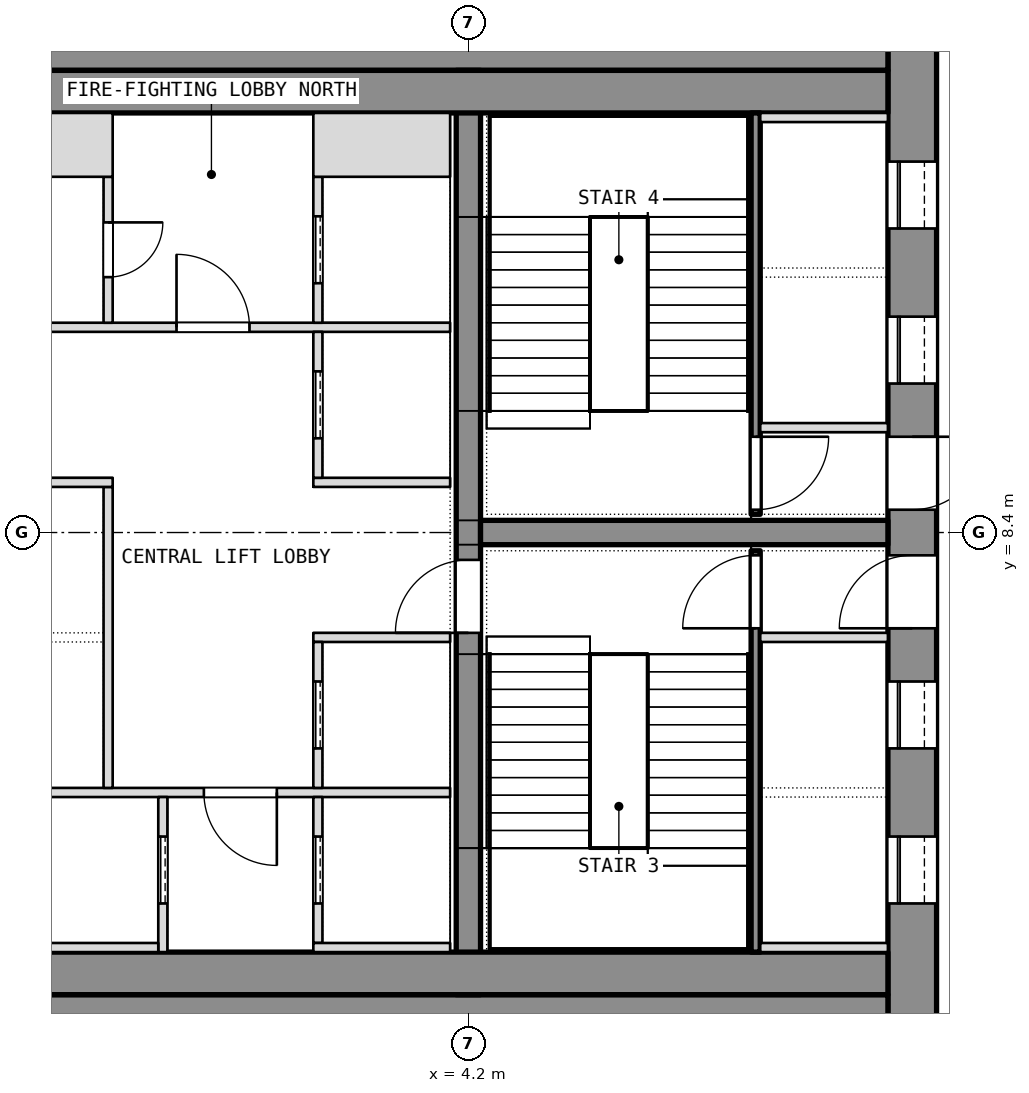
"""IFC4 building model, lengths in metres.
Left out: names, types, materials, properties, quantities, classifications, styles, units other than length and angle.
Written with IfcOpenShell. Run it as: python <this file> out.ifc"""

import sys

from ifc_helpers import new_model, si_unit, direction, frame, frame_2d, origin, place, context, subcontext, project, spatial, rectangle, extrude, element, fill, save


model = new_model("IFC4")
c1 = context("Model", 3, precision=1e-05, world=origin(), true_north=direction((0.0, 1.0)))
c2 = subcontext(c1, "Body", "Model", "MODEL_VIEW")
j1 = project(units=[si_unit("LENGTHUNIT", "METRE"), si_unit("PLANEANGLEUNIT", "RADIAN")], contexts=[c1])
p1 = place(None, origin())
s1 = spatial("IfcSite", under=j1, at=p1, CompositionType="ELEMENT")
p2 = place(p1, origin())
s2 = spatial("IfcBuilding", under=s1, at=p2, CompositionType="ELEMENT")
p3 = place(p2, frame((0.0, 0.0, 180.5)))
s3 = spatial("IfcBuildingStorey", under=s2, at=p3, CompositionType="ELEMENT", Elevation=180.5)
p4 = place(p3, frame((11.5, 0.0, 0.0), z_axis=(0.0, 0.0, 1.0), x_axis=(0.0, 1.0, 0.0)))
e1 = element("IfcWall", 1, at=p4, inside=s3, PredefinedType="SHEAR", context=c2, shape_type="SweptSolid", body=[
    extrude(rectangle(XDim=16.8, YDim=0.8, at=frame_2d((8.4, 0.0))), origin(), (0.0, 0.0, 1.0), 7.2),
])
p5 = place(p4, frame((2.3, 0.0, 0.0)))
e2 = element("IfcOpeningElement", 2, at=p5, cuts=e1, PredefinedType="OPENING", context=c2, shape_type="SweptSolid", body=[
    extrude(rectangle(XDim=1.1, YDim=2.1, at=frame_2d((0.55, 1.05))), frame((0.0, 0.4, 0.0), z_axis=(0.0, -1.0, 0.0), x_axis=(1.0, 0.0, 0.0)), (0.0, 0.0, 1.0), 0.8),
])
p6 = place(p4, frame((4.85, 0.0, 0.0)))
e3 = element("IfcOpeningElement", 3, at=p6, cuts=e1, PredefinedType="OPENING", context=c2, shape_type="SweptSolid", body=[
    extrude(rectangle(XDim=1.1, YDim=2.1, at=frame_2d((0.55, 1.05))), frame((0.0, 0.4, 0.0), z_axis=(0.0, -1.0, 0.0), x_axis=(1.0, 0.0, 0.0)), (0.0, 0.0, 1.0), 0.8),
])
p7 = place(p4, frame((6.825, 0.0, 0.0)))
e4 = element("IfcOpeningElement", 4, at=p7, cuts=e1, PredefinedType="OPENING", context=c2, shape_type="SweptSolid", body=[
    extrude(rectangle(XDim=1.2, YDim=2.1, at=frame_2d((0.6, 1.05))), frame((0.0, 0.4, 0.0), z_axis=(0.0, -1.0, 0.0), x_axis=(1.0, 0.0, 0.0)), (0.0, 0.0, 1.0), 0.8),
])
p8 = place(p4, frame((13.4, 0.0, 0.0)))
e5 = element("IfcOpeningElement", 5, at=p8, cuts=e1, PredefinedType="OPENING", context=c2, shape_type="SweptSolid", body=[
    extrude(rectangle(XDim=1.1, YDim=2.1, at=frame_2d((0.55, 1.05))), frame((0.0, 0.4, 0.0), z_axis=(0.0, -1.0, 0.0), x_axis=(1.0, 0.0, 0.0)), (0.0, 0.0, 1.0), 0.8),
])
p9 = place(p4, frame((10.85, 0.0, 0.0)))
e6 = element("IfcOpeningElement", 6, at=p9, cuts=e1, PredefinedType="OPENING", context=c2, shape_type="SweptSolid", body=[
    extrude(rectangle(XDim=1.1, YDim=2.1, at=frame_2d((0.55, 1.05))), frame((0.0, 0.4, 0.0), z_axis=(0.0, -1.0, 0.0), x_axis=(1.0, 0.0, 0.0)), (0.0, 0.0, 1.0), 0.8),
])
p10 = place(p4, frame((8.775, 0.0, 0.0)))
e7 = element("IfcOpeningElement", 7, at=p10, cuts=e1, PredefinedType="OPENING", context=c2, shape_type="SweptSolid", body=[
    extrude(rectangle(XDim=1.2, YDim=2.1, at=frame_2d((0.6, 1.05))), frame((0.0, 0.4, 0.0), z_axis=(0.0, -1.0, 0.0), x_axis=(1.0, 0.0, 0.0)), (0.0, 0.0, 1.0), 0.8),
])
for number, where, z_axis, x_axis in (
    (8, (-11.1, 0.4, 0.0), (0.0, 0.0, 1.0), (1.0, 0.0, 0.0)),
    (9, (-11.1, 16.4, 0.0), (0.0, 0.0, 1.0), (1.0, 0.0, 0.0)),
):
    element("IfcWall", number, at=place(p3, frame(where, z_axis=z_axis, x_axis=x_axis)), inside=s3, PredefinedType="SHEAR", context=c2, shape_type="SweptSolid", body=[
        extrude(rectangle(XDim=22.2, YDim=0.8, at=frame_2d((11.1, 0.0))), origin(), (0.0, 0.0, 1.0), 7.2),
    ])
p11 = place(p3, frame((4.2, 0.8, 0.0), z_axis=(0.0, 0.0, 1.0), x_axis=(0.0, 1.0, 0.0)))
e10 = element("IfcWall", 10, at=p11, inside=s3, PredefinedType="SHEAR", context=c2, shape_type="SweptSolid", body=[
    extrude(rectangle(XDim=15.2, YDim=0.4, at=frame_2d((7.6, 0.0))), origin(), (0.0, 0.0, 1.0), 7.2),
])
p12 = place(p11, frame((5.95, 0.0, 0.0)))
e11 = element("IfcOpeningElement", 11, at=p12, cuts=e10, PredefinedType="OPENING", context=c2, shape_type="SweptSolid", body=[
    extrude(rectangle(XDim=1.2, YDim=2.1, at=frame_2d((0.6, 1.05))), frame((0.0, 0.2, 0.0), z_axis=(0.0, -1.0, 0.0), x_axis=(1.0, 0.0, 0.0)), (0.0, 0.0, 1.0), 0.4),
])
p13 = place(p3, frame((4.4, 8.4, 0.0), z_axis=(0.0, 0.0, 1.0), x_axis=(1.0, 0.0, 0.0)))
e12 = element("IfcWall", 12, at=p13, inside=s3, PredefinedType="SHEAR", context=c2, shape_type="SweptSolid", body=[
    extrude(rectangle(XDim=6.7, YDim=0.4, at=frame_2d((3.35, 0.0))), origin(), (0.0, 0.0, 1.0), 7.2),
])
for number, where, z_axis, x_axis in (
    (13, (-11.1, 1.15, 0.0), (0.0, 0.0, 1.0), (1.0, 0.0, 0.0)),
    (14, (-11.1, 15.65, 0.0), (0.0, 0.0, 1.0), (1.0, 0.0, 0.0)),
):
    element("IfcWall", number, at=place(p3, frame(where, z_axis=z_axis, x_axis=x_axis)), inside=s3, PredefinedType="PARTITIONING", context=c2, shape_type="SweptSolid", body=[
        extrude(rectangle(XDim=22.2, YDim=0.7, at=frame_2d((11.1, 0.0))), origin(), (0.0, 0.0, 1.0), 6.94),
    ])
p14 = place(p3, frame((8.925, 1.5, 0.0), z_axis=(0.0, 0.0, 1.0), x_axis=(0.0, 1.0, 0.0)))
e15 = element("IfcWall", 15, at=p14, inside=s3, PredefinedType="SHEAR", context=c2, shape_type="SweptSolid", body=[
    extrude(rectangle(XDim=6.6, YDim=0.15, at=frame_2d((3.3, 0.0))), origin(), (0.0, 0.0, 1.0), 6.94),
])
p15 = place(p14, frame((5.325, 0.0, 0.0)))
e16 = element("IfcOpeningElement", 16, at=p15, cuts=e15, PredefinedType="OPENING", context=c2, shape_type="SweptSolid", body=[
    extrude(rectangle(XDim=1.2, YDim=2.1, at=frame_2d((0.6, 1.05))), frame((0.0, 0.075, 0.0), z_axis=(0.0, -1.0, 0.0), x_axis=(1.0, 0.0, 0.0)), (0.0, 0.0, 1.0), 0.15),
])
for number, where, z_axis, x_axis in (
    (17, (9.0, 6.675, 0.0), (0.0, 0.0, 1.0), (1.0, 0.0, 0.0)),
    (18, (9.0, 1.575, 0.0), (0.0, 0.0, 1.0), (1.0, 0.0, 0.0)),
):
    element("IfcWall", number, at=place(p3, frame(where, z_axis=z_axis, x_axis=x_axis)), inside=s3, PredefinedType="SHEAR", context=c2, shape_type="SweptSolid", body=[
        extrude(rectangle(XDim=2.1, YDim=0.15, at=frame_2d((1.05, 0.0))), origin(), (0.0, 0.0, 1.0), 7.2),
    ])
p16 = place(p3, frame((8.925, 8.7, 0.0), z_axis=(0.0, 0.0, 1.0), x_axis=(0.0, 1.0, 0.0)))
e19 = element("IfcWall", 19, at=p16, inside=s3, PredefinedType="SHEAR", context=c2, shape_type="SweptSolid", body=[
    extrude(rectangle(XDim=6.6, YDim=0.15, at=frame_2d((3.3, 0.0))), origin(), (0.0, 0.0, 1.0), 6.94),
])
p17 = place(p16, frame((0.075, 0.0, 0.0)))
e20 = element("IfcOpeningElement", 20, at=p17, cuts=e19, PredefinedType="OPENING", context=c2, shape_type="SweptSolid", body=[
    extrude(rectangle(XDim=1.2, YDim=2.1, at=frame_2d((0.6, 1.05))), frame((0.0, 0.075, 0.0), z_axis=(0.0, -1.0, 0.0), x_axis=(1.0, 0.0, 0.0)), (0.0, 0.0, 1.0), 0.15),
])
for number, where, z_axis, x_axis in (
    (21, (9.0, 10.125, 0.0), (0.0, 0.0, 1.0), (1.0, 0.0, 0.0)),
    (22, (9.0, 15.225, 0.0), (0.0, 0.0, 1.0), (1.0, 0.0, 0.0)),
):
    element("IfcWall", number, at=place(p3, frame(where, z_axis=z_axis, x_axis=x_axis)), inside=s3, PredefinedType="SHEAR", context=c2, shape_type="SweptSolid", body=[
        extrude(rectangle(XDim=2.1, YDim=0.15, at=frame_2d((1.05, 0.0))), origin(), (0.0, 0.0, 1.0), 7.2),
    ])
p18 = place(p3, frame((-3.9, 4.125, 0.0), z_axis=(0.0, 0.0, 1.0), x_axis=(1.0, 0.0, 0.0)))
e23 = element("IfcWall", 23, at=p18, inside=s3, PredefinedType="PARTITIONING", context=c2, shape_type="SweptSolid", body=[
    extrude(rectangle(XDim=7.8, YDim=0.15, at=frame_2d((3.9, 0.0))), origin(), (0.0, 0.0, 1.0), 6.94),
])
p19 = place(p18, frame((3.75, 0.0, 0.0)))
e24 = element("IfcOpeningElement", 24, at=p19, cuts=e23, PredefinedType="OPENING", context=c2, shape_type="SweptSolid", body=[
    extrude(rectangle(XDim=1.2, YDim=2.1, at=frame_2d((0.6, 1.05))), frame((0.0, 0.075, 0.0), z_axis=(0.0, -1.0, 0.0), x_axis=(1.0, 0.0, 0.0)), (0.0, 0.0, 1.0), 0.15),
])
p20 = place(p3, frame((-3.9, 11.775, 0.0), z_axis=(0.0, 0.0, 1.0), x_axis=(1.0, 0.0, 0.0)))
e25 = element("IfcWall", 25, at=p20, inside=s3, PredefinedType="PARTITIONING", context=c2, shape_type="SweptSolid", body=[
    extrude(rectangle(XDim=7.8, YDim=0.15, at=frame_2d((3.9, 0.0))), origin(), (0.0, 0.0, 1.0), 6.94),
])
p21 = place(p20, frame((3.3, 0.0, 0.0)))
e26 = element("IfcOpeningElement", 26, at=p21, cuts=e25, PredefinedType="OPENING", context=c2, shape_type="SweptSolid", body=[
    extrude(rectangle(XDim=1.2, YDim=2.1, at=frame_2d((0.6, 1.05))), frame((0.0, 0.075, 0.0), z_axis=(0.0, -1.0, 0.0), x_axis=(1.0, 0.0, 0.0)), (0.0, 0.0, 1.0), 0.15),
])
p22 = place(p3, frame((-0.825, 1.5, 0.0), z_axis=(0.0, 0.0, 1.0), x_axis=(0.0, 1.0, 0.0)))
e27 = element("IfcWall", 27, at=p22, inside=s3, PredefinedType="SHEAR", context=c2, shape_type="SweptSolid", body=[
    extrude(rectangle(XDim=2.55, YDim=0.15, at=frame_2d((1.275, 0.0))), origin(), (0.0, 0.0, 1.0), 7.2),
])
p23 = place(p22, frame((0.8, 0.0, 0.0)))
e28 = element("IfcOpeningElement", 28, at=p23, cuts=e27, PredefinedType="OPENING", context=c2, shape_type="SweptSolid", body=[
    extrude(rectangle(XDim=1.1, YDim=2.1, at=frame_2d((0.55, 1.05))), frame((0.0, 0.075, 0.0), z_axis=(0.0, -1.0, 0.0), x_axis=(1.0, 0.0, 0.0)), (0.0, 0.0, 1.0), 0.15),
])
p24 = place(p3, frame((-3.9, 1.575, 0.0), z_axis=(0.0, 0.0, 1.0), x_axis=(1.0, 0.0, 0.0)))
e29 = element("IfcWall", 29, at=p24, inside=s3, PredefinedType="SHEAR", context=c2, shape_type="SweptSolid", body=[
    extrude(rectangle(XDim=3.0, YDim=0.15, at=frame_2d((1.5, 0.0))), origin(), (0.0, 0.0, 1.0), 7.2),
])
p25 = place(p3, frame((-1.725, 4.2, 0.0), z_axis=(0.0, 0.0, 1.0), x_axis=(0.0, 1.0, 0.0)))
e30 = element("IfcWall", 30, at=p25, inside=s3, PredefinedType="SHEAR", context=c2, shape_type="SweptSolid", body=[
    extrude(rectangle(XDim=4.95, YDim=0.15, at=frame_2d((2.475, 0.0))), origin(), (0.0, 0.0, 1.0), 7.2),
])
p26 = place(p3, frame((-3.9, 9.225, 0.0), z_axis=(0.0, 0.0, 1.0), x_axis=(1.0, 0.0, 0.0)))
e31 = element("IfcWall", 31, at=p26, inside=s3, PredefinedType="SHEAR", context=c2, shape_type="SweptSolid", body=[
    extrude(rectangle(XDim=2.25, YDim=0.15, at=frame_2d((1.125, 0.0))), origin(), (0.0, 0.0, 1.0), 7.2),
])
p27 = place(p3, frame((-1.725, 11.85, 0.0), z_axis=(0.0, 0.0, 1.0), x_axis=(0.0, 1.0, 0.0)))
e32 = element("IfcWall", 32, at=p27, inside=s3, PredefinedType="PARTITIONING", context=c2, shape_type="SweptSolid", body=[
    extrude(rectangle(XDim=2.4, YDim=0.15, at=frame_2d((1.2, 0.0))), origin(), (0.0, 0.0, 1.0), 6.94),
])
p28 = place(p27, frame((0.75, 0.0, 0.0)))
e33 = element("IfcOpeningElement", 33, at=p28, cuts=e32, PredefinedType="OPENING", context=c2, shape_type="SweptSolid", body=[
    extrude(rectangle(XDim=0.9, YDim=2.1, at=frame_2d((0.45, 1.05))), frame((0.0, 0.075, 0.0), z_axis=(0.0, -1.0, 0.0), x_axis=(1.0, 0.0, 0.0)), (0.0, 0.0, 1.0), 0.15),
])
p29 = place(p3, frame((-3.9, 14.775, 0.0), z_axis=(0.0, 0.0, 1.0), x_axis=(1.0, 0.0, 0.0)))
e34 = element("IfcWall", 34, at=p29, inside=s3, PredefinedType="PARTITIONING", context=c2, shape_type="SweptSolid", body=[
    extrude(rectangle(XDim=2.25, YDim=1.05, at=frame_2d((1.125, 0.0))), origin(), (0.0, 0.0, 1.0), 6.94),
])
p30 = place(p3, frame((1.725, 1.65, 0.0), z_axis=(0.0, 0.0, 1.0), x_axis=(0.0, 1.0, 0.0)))
e35 = element("IfcWall", 35, at=p30, inside=s3, PredefinedType="SHEAR", context=c2, shape_type="SweptSolid", body=[
    extrude(rectangle(XDim=2.4, YDim=0.15, at=frame_2d((1.2, 0.0))), origin(), (0.0, 0.0, 1.0), 7.2),
])
p31 = place(p30, frame((0.65, 0.0, 0.0)))
e36 = element("IfcOpeningElement", 36, at=p31, cuts=e35, PredefinedType="OPENING", context=c2, shape_type="SweptSolid", body=[
    extrude(rectangle(XDim=1.1, YDim=2.1, at=frame_2d((0.55, 1.05))), frame((0.0, 0.075, 0.0), z_axis=(0.0, -1.0, 0.0), x_axis=(1.0, 0.0, 0.0)), (0.0, 0.0, 1.0), 0.15),
])
p32 = place(p3, frame((1.65, 1.575, 0.0), z_axis=(0.0, 0.0, 1.0), x_axis=(1.0, 0.0, 0.0)))
e37 = element("IfcWall", 37, at=p32, inside=s3, PredefinedType="SHEAR", context=c2, shape_type="SweptSolid", body=[
    extrude(rectangle(XDim=2.25, YDim=0.15, at=frame_2d((1.125, 0.0))), origin(), (0.0, 0.0, 1.0), 7.2),
])
p33 = place(p3, frame((1.725, 11.85, 0.0), z_axis=(0.0, 0.0, 1.0), x_axis=(0.0, 1.0, 0.0)))
e38 = element("IfcWall", 38, at=p33, inside=s3, PredefinedType="SHEAR", context=c2, shape_type="SweptSolid", body=[
    extrude(rectangle(XDim=2.4, YDim=0.15, at=frame_2d((1.2, 0.0))), origin(), (0.0, 0.0, 1.0), 7.2),
])
p34 = place(p33, frame((0.65, 0.0, 0.0)))
e39 = element("IfcOpeningElement", 39, at=p34, cuts=e38, PredefinedType="OPENING", context=c2, shape_type="SweptSolid", body=[
    extrude(rectangle(XDim=1.1, YDim=2.1, at=frame_2d((0.55, 1.05))), frame((0.0, 0.075, 0.0), z_axis=(0.0, -1.0, 0.0), x_axis=(1.0, 0.0, 0.0)), (0.0, 0.0, 1.0), 0.15),
])
p35 = place(p3, frame((1.65, 14.775, 0.0), z_axis=(0.0, 0.0, 1.0), x_axis=(1.0, 0.0, 0.0)))
e40 = element("IfcWall", 40, at=p35, inside=s3, PredefinedType="SHEAR", context=c2, shape_type="SweptSolid", body=[
    extrude(rectangle(XDim=2.25, YDim=1.05, at=frame_2d((1.125, 0.0))), origin(), (0.0, 0.0, 1.0), 7.2),
])
for number, where, z_axis, x_axis in (
    (41, (1.65, 6.675, 0.0), (0.0, 0.0, 1.0), (1.0, 0.0, 0.0)),
    (42, (1.65, 9.225, 0.0), (0.0, 0.0, 1.0), (1.0, 0.0, 0.0)),
):
    element("IfcWall", number, at=place(p3, frame(where, z_axis=z_axis, x_axis=x_axis)), inside=s3, PredefinedType="SHEAR", context=c2, shape_type="SweptSolid", body=[
        extrude(rectangle(XDim=2.25, YDim=0.15, at=frame_2d((1.125, 0.0))), origin(), (0.0, 0.0, 1.0), 6.94),
    ])
p36 = place(p3, frame((1.725, 4.2, 0.0), z_axis=(0.0, 0.0, 1.0), x_axis=(0.0, 1.0, 0.0)))
e43 = element("IfcWall", 43, at=p36, inside=s3, PredefinedType="SHEAR", context=c2, shape_type="SweptSolid", body=[
    extrude(rectangle(XDim=2.4, YDim=0.15, at=frame_2d((1.2, 0.0))), origin(), (0.0, 0.0, 1.0), 6.94),
])
p37 = place(p36, frame((0.65, 0.0, 0.0)))
e44 = element("IfcOpeningElement", 44, at=p37, cuts=e43, PredefinedType="OPENING", context=c2, shape_type="SweptSolid", body=[
    extrude(rectangle(XDim=1.1, YDim=2.1, at=frame_2d((0.55, 1.05))), frame((0.0, 0.075, 0.0), z_axis=(0.0, -1.0, 0.0), x_axis=(1.0, 0.0, 0.0)), (0.0, 0.0, 1.0), 0.15),
])
p38 = place(p3, frame((1.725, 9.3, 0.0), z_axis=(0.0, 0.0, 1.0), x_axis=(0.0, 1.0, 0.0)))
e45 = element("IfcWall", 45, at=p38, inside=s3, PredefinedType="SHEAR", context=c2, shape_type="SweptSolid", body=[
    extrude(rectangle(XDim=2.4, YDim=0.15, at=frame_2d((1.2, 0.0))), origin(), (0.0, 0.0, 1.0), 6.94),
])
p39 = place(p38, frame((0.65, 0.0, 0.0)))
e46 = element("IfcOpeningElement", 46, at=p39, cuts=e45, PredefinedType="OPENING", context=c2, shape_type="SweptSolid", body=[
    extrude(rectangle(XDim=1.1, YDim=2.1, at=frame_2d((0.55, 1.05))), frame((0.0, 0.075, 0.0), z_axis=(0.0, -1.0, 0.0), x_axis=(1.0, 0.0, 0.0)), (0.0, 0.0, 1.0), 0.15),
])
p40 = place(p5, origin())
e47 = element("IfcDoor", 47, at=p40, inside=s3, OperationType="SLIDING_TO_LEFT", PredefinedType="DOOR", context=c2, shape_type="SweptSolid", body=[
    extrude(rectangle(XDim=1.1, YDim=2.1, at=frame_2d((0.55, 1.05))), frame((0.0, 0.025, 0.0), z_axis=(0.0, -1.0, 0.0), x_axis=(1.0, 0.0, 0.0)), (0.0, 0.0, 1.0), 0.05),
])
fill(e2, e47)
p41 = place(p6, origin())
e48 = element("IfcDoor", 48, at=p41, inside=s3, OperationType="SLIDING_TO_LEFT", PredefinedType="DOOR", context=c2, shape_type="SweptSolid", body=[
    extrude(rectangle(XDim=1.1, YDim=2.1, at=frame_2d((0.55, 1.05))), frame((0.0, 0.025, 0.0), z_axis=(0.0, -1.0, 0.0), x_axis=(1.0, 0.0, 0.0)), (0.0, 0.0, 1.0), 0.05),
])
fill(e3, e48)
p42 = place(p7, origin())
e49 = element("IfcDoor", 49, at=p42, inside=s3, OperationType="SINGLE_SWING_LEFT", PredefinedType="DOOR", context=c2, shape_type="SweptSolid", body=[
    extrude(rectangle(XDim=1.2, YDim=2.1, at=frame_2d((0.6, 1.05))), frame((0.0, 0.025, 0.0), z_axis=(0.0, -1.0, 0.0), x_axis=(1.0, 0.0, 0.0)), (0.0, 0.0, 1.0), 0.05),
])
fill(e4, e49)
p43 = place(p15, origin())
e50 = element("IfcDoor", 50, at=p43, inside=s3, OperationType="SINGLE_SWING_LEFT", PredefinedType="DOOR", context=c2, shape_type="SweptSolid", body=[
    extrude(rectangle(XDim=1.2, YDim=2.1, at=frame_2d((0.6, 1.05))), frame((0.0, 0.025, 0.0), z_axis=(0.0, -1.0, 0.0), x_axis=(1.0, 0.0, 0.0)), (0.0, 0.0, 1.0), 0.05),
])
fill(e16, e50)
p44 = place(p8, origin())
e51 = element("IfcDoor", 51, at=p44, inside=s3, OperationType="SLIDING_TO_LEFT", PredefinedType="DOOR", context=c2, shape_type="SweptSolid", body=[
    extrude(rectangle(XDim=1.1, YDim=2.1, at=frame_2d((0.55, 1.05))), frame((0.0, 0.025, 0.0), z_axis=(0.0, -1.0, 0.0), x_axis=(1.0, 0.0, 0.0)), (0.0, 0.0, 1.0), 0.05),
])
fill(e5, e51)
p45 = place(p9, origin())
e52 = element("IfcDoor", 52, at=p45, inside=s3, OperationType="SLIDING_TO_LEFT", PredefinedType="DOOR", context=c2, shape_type="SweptSolid", body=[
    extrude(rectangle(XDim=1.1, YDim=2.1, at=frame_2d((0.55, 1.05))), frame((0.0, 0.025, 0.0), z_axis=(0.0, -1.0, 0.0), x_axis=(1.0, 0.0, 0.0)), (0.0, 0.0, 1.0), 0.05),
])
fill(e6, e52)
p46 = place(p10, origin())
e53 = element("IfcDoor", 53, at=p46, inside=s3, OperationType="SINGLE_SWING_LEFT", PredefinedType="DOOR", context=c2, shape_type="SweptSolid", body=[
    extrude(rectangle(XDim=1.2, YDim=2.1, at=frame_2d((0.6, 1.05))), frame((0.0, 0.025, 0.0), z_axis=(0.0, -1.0, 0.0), x_axis=(1.0, 0.0, 0.0)), (0.0, 0.0, 1.0), 0.05),
])
fill(e7, e53)
p47 = place(p17, origin())
e54 = element("IfcDoor", 54, at=p47, inside=s3, OperationType="SINGLE_SWING_LEFT", PredefinedType="DOOR", context=c2, shape_type="SweptSolid", body=[
    extrude(rectangle(XDim=1.2, YDim=2.1, at=frame_2d((0.6, 1.05))), frame((0.0, 0.025, 0.0), z_axis=(0.0, -1.0, 0.0), x_axis=(1.0, 0.0, 0.0)), (0.0, 0.0, 1.0), 0.05),
])
fill(e20, e54)
p48 = place(p23, origin())
e55 = element("IfcDoor", 55, at=p48, inside=s3, OperationType="SLIDING_TO_LEFT", PredefinedType="DOOR", context=c2, shape_type="SweptSolid", body=[
    extrude(rectangle(XDim=1.1, YDim=2.1, at=frame_2d((0.55, 1.05))), frame((0.0, 0.025, 0.0), z_axis=(0.0, -1.0, 0.0), x_axis=(1.0, 0.0, 0.0)), (0.0, 0.0, 1.0), 0.05),
])
fill(e28, e55)
p49 = place(p31, origin())
e56 = element("IfcDoor", 56, at=p49, inside=s3, OperationType="SLIDING_TO_LEFT", PredefinedType="DOOR", context=c2, shape_type="SweptSolid", body=[
    extrude(rectangle(XDim=1.1, YDim=2.1, at=frame_2d((0.55, 1.05))), frame((0.0, 0.025, 0.0), z_axis=(0.0, -1.0, 0.0), x_axis=(1.0, 0.0, 0.0)), (0.0, 0.0, 1.0), 0.05),
])
fill(e36, e56)
p50 = place(p37, origin())
e57 = element("IfcDoor", 57, at=p50, inside=s3, OperationType="SLIDING_TO_LEFT", PredefinedType="DOOR", context=c2, shape_type="SweptSolid", body=[
    extrude(rectangle(XDim=1.1, YDim=2.1, at=frame_2d((0.55, 1.05))), frame((0.0, 0.025, 0.0), z_axis=(0.0, -1.0, 0.0), x_axis=(1.0, 0.0, 0.0)), (0.0, 0.0, 1.0), 0.05),
])
fill(e44, e57)
p51 = place(p39, origin())
e58 = element("IfcDoor", 58, at=p51, inside=s3, OperationType="SLIDING_TO_LEFT", PredefinedType="DOOR", context=c2, shape_type="SweptSolid", body=[
    extrude(rectangle(XDim=1.1, YDim=2.1, at=frame_2d((0.55, 1.05))), frame((0.0, 0.025, 0.0), z_axis=(0.0, -1.0, 0.0), x_axis=(1.0, 0.0, 0.0)), (0.0, 0.0, 1.0), 0.05),
])
fill(e46, e58)
p52 = place(p34, origin())
e59 = element("IfcDoor", 59, at=p52, inside=s3, OperationType="SLIDING_TO_LEFT", PredefinedType="DOOR", context=c2, shape_type="SweptSolid", body=[
    extrude(rectangle(XDim=1.1, YDim=2.1, at=frame_2d((0.55, 1.05))), frame((0.0, 0.025, 0.0), z_axis=(0.0, -1.0, 0.0), x_axis=(1.0, 0.0, 0.0)), (0.0, 0.0, 1.0), 0.05),
])
fill(e39, e59)
p53 = place(p19, origin())
e60 = element("IfcDoor", 60, at=p53, inside=s3, OperationType="SINGLE_SWING_LEFT", PredefinedType="DOOR", context=c2, shape_type="SweptSolid", body=[
    extrude(rectangle(XDim=1.2, YDim=2.1, at=frame_2d((0.6, 1.05))), frame((0.0, 0.025, 0.0), z_axis=(0.0, -1.0, 0.0), x_axis=(1.0, 0.0, 0.0)), (0.0, 0.0, 1.0), 0.05),
])
fill(e24, e60)
p54 = place(p21, origin())
e61 = element("IfcDoor", 61, at=p54, inside=s3, OperationType="SINGLE_SWING_LEFT", PredefinedType="DOOR", context=c2, shape_type="SweptSolid", body=[
    extrude(rectangle(XDim=1.2, YDim=2.1, at=frame_2d((0.6, 1.05))), frame((0.0, 0.025, 0.0), z_axis=(0.0, -1.0, 0.0), x_axis=(1.0, 0.0, 0.0)), (0.0, 0.0, 1.0), 0.05),
])
fill(e26, e61)
p55 = place(p28, origin())
e62 = element("IfcDoor", 62, at=p55, inside=s3, OperationType="SINGLE_SWING_LEFT", PredefinedType="DOOR", context=c2, shape_type="SweptSolid", body=[
    extrude(rectangle(XDim=0.9, YDim=2.1, at=frame_2d((0.45, 1.05))), frame((0.0, 0.025, 0.0), z_axis=(0.0, -1.0, 0.0), x_axis=(1.0, 0.0, 0.0)), (0.0, 0.0, 1.0), 0.05),
])
fill(e33, e62)
p56 = place(p12, origin())
e63 = element("IfcDoor", 63, at=p56, inside=s3, OperationType="SINGLE_SWING_LEFT", PredefinedType="DOOR", context=c2, shape_type="SweptSolid", body=[
    extrude(rectangle(XDim=1.2, YDim=2.1, at=frame_2d((0.6, 1.05))), frame((0.0, 0.025, 0.0), z_axis=(0.0, -1.0, 0.0), x_axis=(1.0, 0.0, 0.0)), (0.0, 0.0, 1.0), 0.05),
])
fill(e11, e63)
save(model, sys.argv[1])
